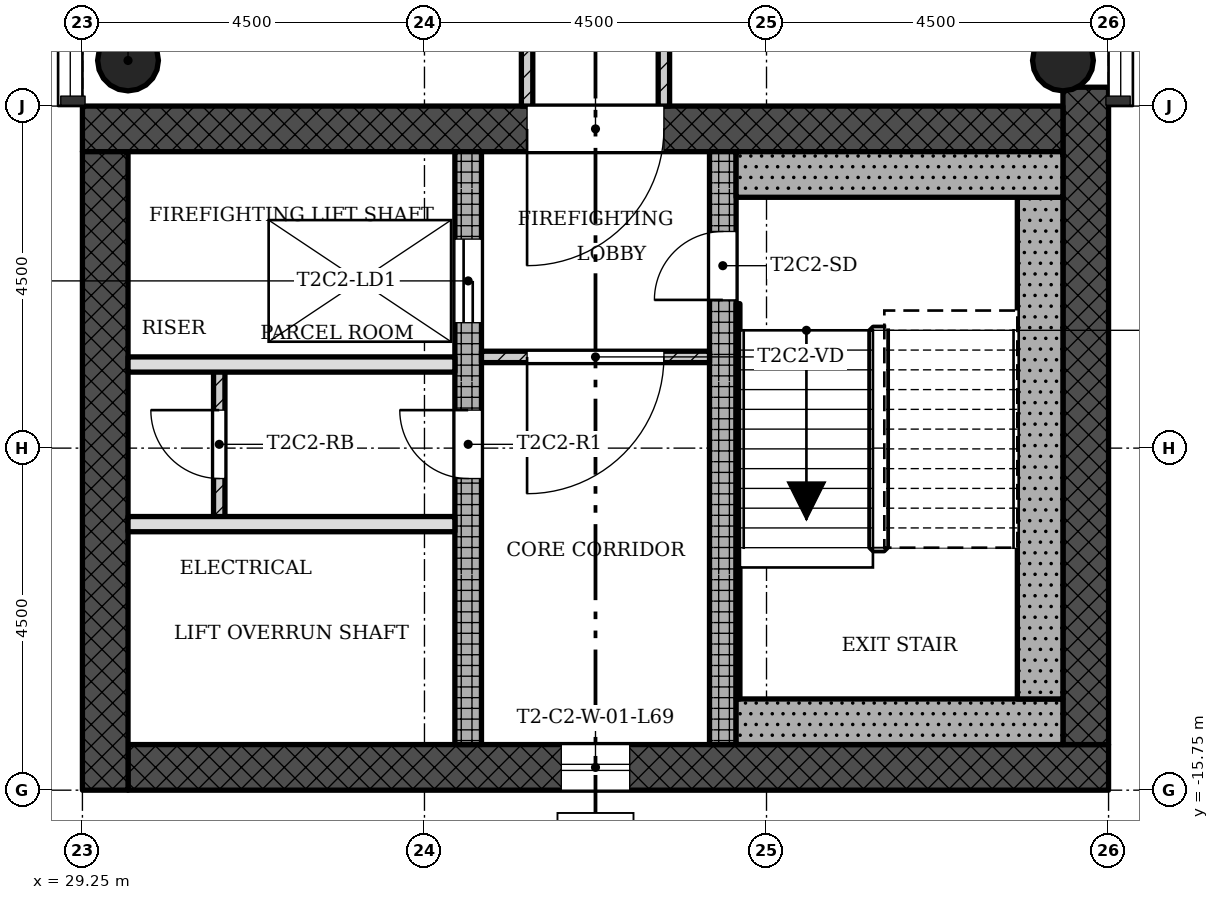
"""IFC4 building model, lengths in metres.
Left out: names, types, materials, properties, quantities, classifications, styles, units other than length and angle.
Written with IfcOpenShell. Run it as: python <this file> out.ifc"""

import sys

from ifc_helpers import new_model, si_unit, direction, frame, frame_2d, origin, origin_2d, place, context, subcontext, project, spatial, rectangle, hollow_circle, extrude, element, fill, save


model = new_model("IFC4")
c1 = context("Model", 3, precision=1e-05, world=origin(), true_north=direction((0.0, 1.0)))
c2 = subcontext(c1, "Body", "Model", "MODEL_VIEW")
j1 = project(units=[si_unit("LENGTHUNIT", "METRE"), si_unit("PLANEANGLEUNIT", "RADIAN")], contexts=[c1])
p1 = place(None, origin())
s1 = spatial("IfcSite", under=j1, at=p1, CompositionType="ELEMENT")
p2 = place(p1, origin())
s2 = spatial("IfcBuilding", under=s1, at=p2, CompositionType="ELEMENT")
p3 = place(p2, frame((0.0, 0.0, 251.4)))
s3 = spatial("IfcBuildingStorey", under=s2, at=p3, CompositionType="ELEMENT", Elevation=251.4)
p4 = place(p3, frame((29.85, -15.45, 0.0), z_axis=(0.0, 0.0, 1.0), x_axis=(1.0, 0.0, 0.0)))
e1 = element("IfcWall", 1, at=p4, inside=s3, PredefinedType="SHEAR", context=c2, shape_type="SweptSolid", body=[
    extrude(rectangle(XDim=12.9, YDim=0.6, at=frame_2d((6.45, 0.0))), origin(), (0.0, 0.0, 1.0), 4.5),
])
p5 = place(p4, frame((5.7, 0.0, 0.45)))
e2 = element("IfcOpeningElement", 2, at=p5, cuts=e1, PredefinedType="OPENING", context=c2, shape_type="SweptSolid", body=[
    extrude(rectangle(XDim=0.9, YDim=2.4, at=frame_2d((0.45, 1.2))), frame((0.0, 0.31, 0.0), z_axis=(0.0, -1.0, 0.0), x_axis=(1.0, 0.0, 0.0)), (0.0, 0.0, 1.0), 0.62),
])
p6 = place(p3, frame((42.45, -15.15, 0.0), z_axis=(0.0, 0.0, 1.0), x_axis=(0.0, 1.0, 0.0)))
e3 = element("IfcWall", 3, at=p6, inside=s3, PredefinedType="SHEAR", context=c2, shape_type="SweptSolid", body=[
    extrude(rectangle(XDim=8.648, YDim=0.6, at=frame_2d((4.324, 0.0))), origin(), (0.0, 0.0, 1.0), 4.5),
])
p7 = place(p3, frame((42.15, -7.05, 0.0), z_axis=(0.0, 0.0, 1.0), x_axis=(-1.0, 0.0, 0.0)))
e4 = element("IfcWall", 4, at=p7, inside=s3, PredefinedType="SHEAR", context=c2, shape_type="SweptSolid", body=[
    extrude(rectangle(XDim=12.9, YDim=0.6, at=frame_2d((6.45, 0.0))), origin(), (0.0, 0.0, 1.0), 4.5),
])
p8 = place(p7, frame((5.25, 0.0, 0.0)))
e5 = element("IfcOpeningElement", 5, at=p8, cuts=e4, PredefinedType="OPENING", context=c2, shape_type="SweptSolid", body=[
    extrude(rectangle(XDim=1.8, YDim=2.1, at=frame_2d((0.9, 1.05))), frame((0.0, 0.31, 0.0), z_axis=(0.0, -1.0, 0.0), x_axis=(1.0, 0.0, 0.0)), (0.0, 0.0, 1.0), 0.62),
])
p9 = place(p3, frame((29.55, -7.35, 0.0), z_axis=(0.0, 0.0, 1.0), x_axis=(0.0, -1.0, 0.0)))
e6 = element("IfcWall", 6, at=p9, inside=s3, PredefinedType="SHEAR", context=c2, shape_type="SweptSolid", body=[
    extrude(rectangle(XDim=8.4, YDim=0.6, at=frame_2d((4.2, 0.0))), origin(), (0.0, 0.0, 1.0), 4.5),
])
p10 = place(p3, frame((34.325, -15.15, 0.0), z_axis=(0.0, 0.0, 1.0), x_axis=(0.0, 1.0, 0.0)))
e7 = element("IfcWall", 7, at=p10, inside=s3, PredefinedType="SHEAR", context=c2, shape_type="SweptSolid", body=[
    extrude(rectangle(XDim=7.8, YDim=0.35, at=frame_2d((3.9, 0.0))), origin(), (0.0, 0.0, 1.0), 4.5),
])
p11 = place(p10, frame((5.55, 0.0, 0.0)))
e8 = element("IfcOpeningElement", 8, at=p11, cuts=e7, PredefinedType="OPENING", context=c2, shape_type="SweptSolid", body=[
    extrude(rectangle(XDim=1.1, YDim=2.1, at=frame_2d((0.55, 1.05))), frame((0.0, 0.185, 0.0), z_axis=(0.0, -1.0, 0.0), x_axis=(1.0, 0.0, 0.0)), (0.0, 0.0, 1.0), 0.37),
])
p12 = place(p10, frame((3.5, 0.0, 0.0)))
e9 = element("IfcOpeningElement", 9, at=p12, cuts=e7, PredefinedType="OPENING", context=c2, shape_type="SweptSolid", body=[
    extrude(rectangle(XDim=0.9, YDim=2.1, at=frame_2d((0.45, 1.05))), frame((0.0, 0.185, 0.0), z_axis=(0.0, -1.0, 0.0), x_axis=(1.0, 0.0, 0.0)), (0.0, 0.0, 1.0), 0.37),
])
p13 = place(p3, frame((37.675, -15.15, 0.0), z_axis=(0.0, 0.0, 1.0), x_axis=(0.0, 1.0, 0.0)))
e10 = element("IfcWall", 10, at=p13, inside=s3, PredefinedType="SHEAR", context=c2, shape_type="SweptSolid", body=[
    extrude(rectangle(XDim=7.8, YDim=0.35, at=frame_2d((3.9, 0.0))), origin(), (0.0, 0.0, 1.0), 4.5),
])
p14 = place(p13, frame((5.85, 0.0, 0.0)))
e11 = element("IfcOpeningElement", 11, at=p14, cuts=e10, PredefinedType="OPENING", context=c2, shape_type="SweptSolid", body=[
    extrude(rectangle(XDim=0.9, YDim=2.1, at=frame_2d((0.45, 1.05))), frame((0.0, 0.185, 0.0), z_axis=(0.0, -1.0, 0.0), x_axis=(1.0, 0.0, 0.0)), (0.0, 0.0, 1.0), 0.37),
])
for number, where, z_axis, x_axis in (
    (12, (42.15, -6.15, 0.0), (0.0, 0.0, 1.0), (1.0, 0.0, 0.0)),
    (13, (29.85, -6.15, 0.0), (0.0, 0.0, 1.0), (1.0, 0.0, 0.0)),
):
    element("IfcColumn", number, at=place(p3, frame(where, z_axis=z_axis, x_axis=x_axis)), inside=s3, PredefinedType="COLUMN", context=c2, shape_type="SweptSolid", body=[
        extrude(hollow_circle(Radius=0.4, WallThickness=0.028, at=origin_2d()), origin(), (0.0, 0.0, 1.0), 4.5),
    ])
p15 = place(p3, frame((34.5, -10.05, 0.0), z_axis=(0.0, 0.0, 1.0), x_axis=(1.0, 0.0, 0.0)))
e14 = element("IfcWall", 14, at=p15, inside=s3, PredefinedType="PARTITIONING", context=c2, shape_type="SweptSolid", body=[
    extrude(rectangle(XDim=3.0, YDim=0.15, at=frame_2d((1.5, 0.0))), origin(), (0.0, 0.0, 1.0), 4.1),
])
p16 = place(p15, frame((0.6, 0.0, 0.0)))
e15 = element("IfcOpeningElement", 15, at=p16, cuts=e14, PredefinedType="OPENING", context=c2, shape_type="SweptSolid", body=[
    extrude(rectangle(XDim=1.8, YDim=2.1, at=frame_2d((0.9, 1.05))), frame((0.0, 0.085, 0.0), z_axis=(0.0, -1.0, 0.0), x_axis=(1.0, 0.0, 0.0)), (0.0, 0.0, 1.0), 0.17),
])
for number, where, z_axis, x_axis in (
    (16, (29.85, -12.25, 0.0), (0.0, 0.0, 1.0), (1.0, 0.0, 0.0)),
    (17, (29.85, -10.15, 0.0), (0.0, 0.0, 1.0), (1.0, 0.0, 0.0)),
):
    element("IfcWall", number, at=place(p3, frame(where, z_axis=z_axis, x_axis=x_axis)), inside=s3, PredefinedType="SOLIDWALL", context=c2, shape_type="SweptSolid", body=[
        extrude(rectangle(XDim=4.3, YDim=0.2, at=frame_2d((2.15, 0.0))), origin(), (0.0, 0.0, 1.0), 4.1),
    ])
p17 = place(p3, frame((31.05, -10.15, 0.0), z_axis=(0.0, 0.0, 1.0), x_axis=(0.0, -1.0, 0.0)))
e18 = element("IfcWall", 18, at=p17, inside=s3, PredefinedType="PARTITIONING", context=c2, shape_type="SweptSolid", body=[
    extrude(rectangle(XDim=2.1, YDim=0.15, at=frame_2d((1.05, 0.0))), origin(), (0.0, 0.0, 1.0), 4.1),
])
p18 = place(p17, frame((0.6, 0.0, 0.0)))
e19 = element("IfcOpeningElement", 19, at=p18, cuts=e18, PredefinedType="OPENING", context=c2, shape_type="SweptSolid", body=[
    extrude(rectangle(XDim=0.9, YDim=2.1, at=frame_2d((0.45, 1.05))), frame((0.0, 0.085, 0.0), z_axis=(0.0, -1.0, 0.0), x_axis=(1.0, 0.0, 0.0)), (0.0, 0.0, 1.0), 0.17),
])
p19 = place(p3, frame((35.1, -6.75, 0.0), z_axis=(0.0, 0.0, 1.0), x_axis=(0.0, 1.0, 0.0)))
e20 = element("IfcWall", 20, at=p19, inside=s3, PredefinedType="PARTITIONING", context=c2, shape_type="SweptSolid", body=[
    extrude(rectangle(XDim=13.5, YDim=0.15, at=frame_2d((6.75, 0.0))), origin(), (0.0, 0.0, 1.0), 4.1),
])
p20 = place(p19, frame((4.05, 0.0, 0.0)))
e21 = element("IfcOpeningElement", 21, at=p20, cuts=e20, PredefinedType="OPENING", context=c2, shape_type="SweptSolid", body=[
    extrude(rectangle(XDim=0.9, YDim=2.1, at=frame_2d((0.45, 1.05))), frame((0.0, 0.085, 0.0), z_axis=(0.0, -1.0, 0.0), x_axis=(1.0, 0.0, 0.0)), (0.0, 0.0, 1.0), 0.17),
])
p21 = place(p19, frame((10.8, 0.0, 0.0)))
e22 = element("IfcOpeningElement", 22, at=p21, cuts=e20, PredefinedType="OPENING", context=c2, shape_type="SweptSolid", body=[
    extrude(rectangle(XDim=0.9, YDim=2.1, at=frame_2d((0.45, 1.05))), frame((0.0, 0.085, 0.0), z_axis=(0.0, -1.0, 0.0), x_axis=(1.0, 0.0, 0.0)), (0.0, 0.0, 1.0), 0.17),
])
p22 = place(p3, frame((36.9, -6.75, 0.0), z_axis=(0.0, 0.0, 1.0), x_axis=(0.0, 1.0, 0.0)))
e23 = element("IfcWall", 23, at=p22, inside=s3, PredefinedType="PARTITIONING", context=c2, shape_type="SweptSolid", body=[
    extrude(rectangle(XDim=13.5, YDim=0.15, at=frame_2d((6.75, 0.0))), origin(), (0.0, 0.0, 1.0), 4.1),
])
p23 = place(p22, frame((4.05, 0.0, 0.0)))
e24 = element("IfcOpeningElement", 24, at=p23, cuts=e23, PredefinedType="OPENING", context=c2, shape_type="SweptSolid", body=[
    extrude(rectangle(XDim=0.9, YDim=2.1, at=frame_2d((0.45, 1.05))), frame((0.0, 0.085, 0.0), z_axis=(0.0, -1.0, 0.0), x_axis=(1.0, 0.0, 0.0)), (0.0, 0.0, 1.0), 0.17),
])
p24 = place(p22, frame((10.8, 0.0, 0.0)))
e25 = element("IfcOpeningElement", 25, at=p24, cuts=e23, PredefinedType="OPENING", context=c2, shape_type="SweptSolid", body=[
    extrude(rectangle(XDim=0.9, YDim=2.1, at=frame_2d((0.45, 1.05))), frame((0.0, 0.085, 0.0), z_axis=(0.0, -1.0, 0.0), x_axis=(1.0, 0.0, 0.0)), (0.0, 0.0, 1.0), 0.17),
])
p25 = place(p3, frame((37.85, -14.85, 0.0), z_axis=(0.0, 0.0, 1.0), x_axis=(1.0, 0.0, 0.0)))
e26 = element("IfcWall", 26, at=p25, inside=s3, PredefinedType="SHEAR", context=c2, shape_type="SweptSolid", body=[
    extrude(rectangle(XDim=4.3, YDim=0.6, at=frame_2d((2.15, 0.0))), origin(), (0.0, 0.0, 1.0), 4.5),
])
p26 = place(p3, frame((41.85, -7.95, 0.0), z_axis=(0.0, 0.0, 1.0), x_axis=(0.0, -1.0, 0.0)))
e27 = element("IfcWall", 27, at=p26, inside=s3, PredefinedType="SHEAR", context=c2, shape_type="SweptSolid", body=[
    extrude(rectangle(XDim=6.6, YDim=0.6, at=frame_2d((3.3, 0.0))), origin(), (0.0, 0.0, 1.0), 4.5),
])
p27 = place(p3, frame((37.85, -7.65, 0.0), z_axis=(0.0, 0.0, 1.0), x_axis=(1.0, 0.0, 0.0)))
e28 = element("IfcWall", 28, at=p27, inside=s3, PredefinedType="SHEAR", context=c2, shape_type="SweptSolid", body=[
    extrude(rectangle(XDim=4.3, YDim=0.6, at=frame_2d((2.15, 0.0))), origin(), (0.0, 0.0, 1.0), 4.5),
])
p28 = place(p3, frame((37.875, -9.35, 0.0), z_axis=(0.0, 0.0, 1.0), x_axis=(0.0, -1.0, 0.0)))
e29 = element("IfcWall", 29, at=p28, inside=s3, PredefinedType="SHEAR", context=c2, shape_type="SweptSolid", body=[
    extrude(rectangle(XDim=5.2, YDim=0.05, at=frame_2d((2.6, 0.0))), origin(), (0.0, 0.0, 1.0), 4.5),
])
p29 = place(p5, origin())
e30 = element("IfcWindow", 30, at=p29, inside=s3, PartitioningType="SINGLE_PANEL", PredefinedType="WINDOW", context=c2, shape_type="SweptSolid", body=[
    extrude(rectangle(XDim=0.9, YDim=2.4, at=frame_2d((0.45, 1.2))), frame((0.0, 0.03, 0.0), z_axis=(0.0, -1.0, 0.0), x_axis=(1.0, 0.0, 0.0)), (0.0, 0.0, 1.0), 0.06),
])
fill(e2, e30)
p30 = place(p16, origin())
e31 = element("IfcDoor", 31, at=p30, inside=s3, OperationType="SINGLE_SWING_LEFT", PredefinedType="DOOR", context=c2, shape_type="SweptSolid", body=[
    extrude(rectangle(XDim=1.8, YDim=2.1, at=frame_2d((0.9, 1.05))), frame((0.0, 0.025, 0.0), z_axis=(0.0, -1.0, 0.0), x_axis=(1.0, 0.0, 0.0)), (0.0, 0.0, 1.0), 0.05),
])
fill(e15, e31)
p31 = place(p18, origin())
e32 = element("IfcDoor", 32, at=p31, inside=s3, OperationType="SINGLE_SWING_LEFT", PredefinedType="DOOR", context=c2, shape_type="SweptSolid", body=[
    extrude(rectangle(XDim=0.9, YDim=2.1, at=frame_2d((0.45, 1.05))), frame((0.0, 0.025, 0.0), z_axis=(0.0, -1.0, 0.0), x_axis=(1.0, 0.0, 0.0)), (0.0, 0.0, 1.0), 0.05),
])
fill(e19, e32)
p32 = place(p14, origin())
e33 = element("IfcDoor", 33, at=p32, inside=s3, OperationType="SINGLE_SWING_RIGHT", PredefinedType="DOOR", context=c2, shape_type="SweptSolid", body=[
    extrude(rectangle(XDim=0.9, YDim=2.1, at=frame_2d((0.45, 1.05))), frame((0.0, 0.025, 0.0), z_axis=(0.0, -1.0, 0.0), x_axis=(1.0, 0.0, 0.0)), (0.0, 0.0, 1.0), 0.05),
])
fill(e11, e33)
p33 = place(p11, origin())
e34 = element("IfcDoor", 34, at=p33, inside=s3, OperationType="SLIDING_TO_LEFT", PredefinedType="DOOR", context=c2, shape_type="SweptSolid", body=[
    extrude(rectangle(XDim=1.1, YDim=2.1, at=frame_2d((0.55, 1.05))), frame((0.0, 0.025, 0.0), z_axis=(0.0, -1.0, 0.0), x_axis=(1.0, 0.0, 0.0)), (0.0, 0.0, 1.0), 0.05),
])
fill(e8, e34)
p34 = place(p12, origin())
e35 = element("IfcDoor", 35, at=p34, inside=s3, OperationType="SINGLE_SWING_LEFT", PredefinedType="DOOR", context=c2, shape_type="SweptSolid", body=[
    extrude(rectangle(XDim=0.9, YDim=2.1, at=frame_2d((0.45, 1.05))), frame((0.0, 0.025, 0.0), z_axis=(0.0, -1.0, 0.0), x_axis=(1.0, 0.0, 0.0)), (0.0, 0.0, 1.0), 0.05),
])
fill(e9, e35)
p35 = place(p8, origin())
e36 = element("IfcDoor", 36, at=p35, inside=s3, OperationType="SINGLE_SWING_LEFT", PredefinedType="DOOR", context=c2, shape_type="SweptSolid", body=[
    extrude(rectangle(XDim=1.8, YDim=2.1, at=frame_2d((0.9, 1.05))), frame((0.0, 0.025, 0.0), z_axis=(0.0, -1.0, 0.0), x_axis=(1.0, 0.0, 0.0)), (0.0, 0.0, 1.0), 0.05),
])
fill(e5, e36)
save(model, sys.argv[1])
